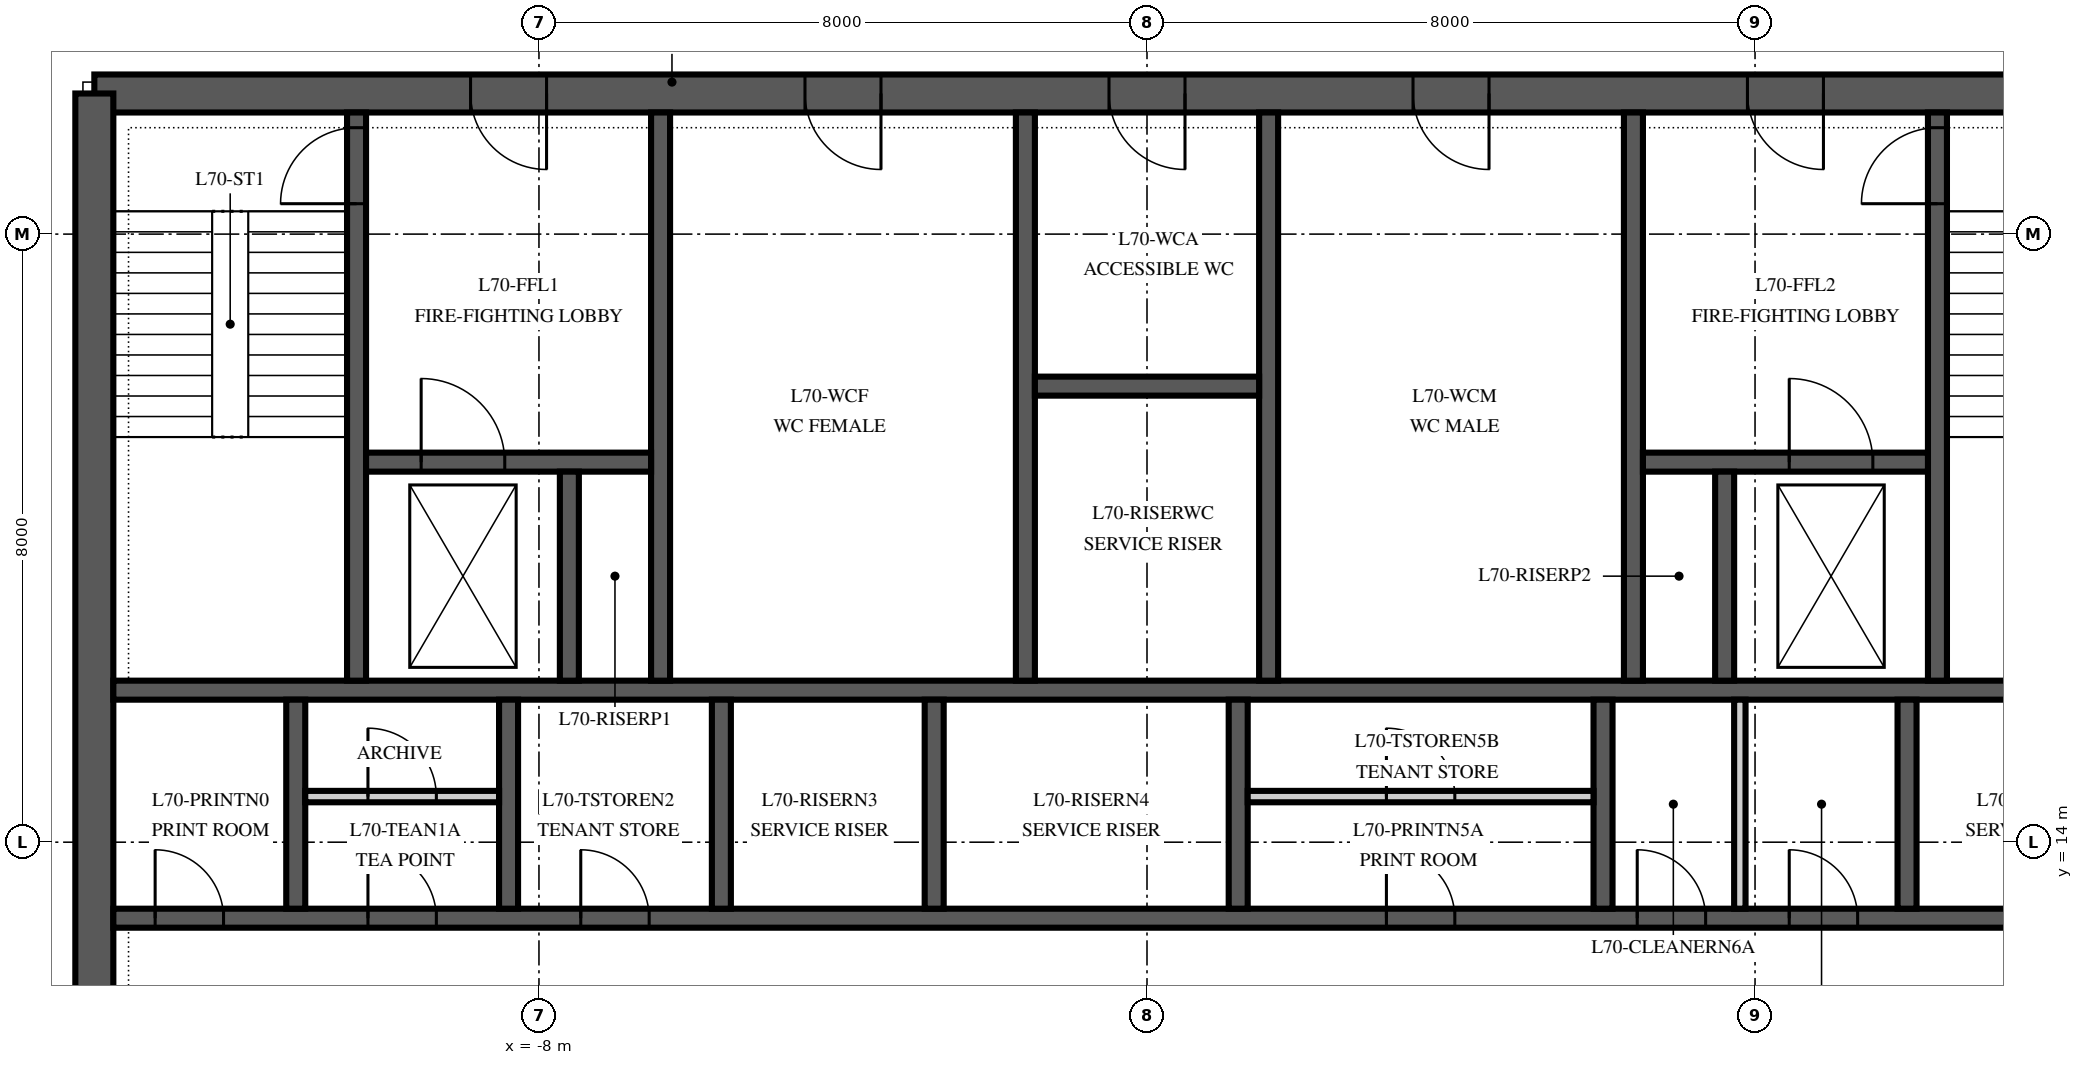
"""IFC4 building model, lengths in metres.
Left out: names, types, materials, properties, quantities, classifications, styles, units other than length and angle.
Written with IfcOpenShell. Run it as: python <this file> out.ifc"""

import sys

from ifc_helpers import new_model, si_unit, direction, frame, frame_2d, origin, place, context, subcontext, project, spatial, polyline, rectangle, outline, extrude, element, fill, save


model = new_model("IFC4")
c1 = context("Model", 3, precision=1e-05, world=origin(), true_north=direction((0.0, 1.0)))
c2 = subcontext(c1, "Body", "Model", "MODEL_VIEW")
j1 = project(units=[si_unit("LENGTHUNIT", "METRE"), si_unit("PLANEANGLEUNIT", "RADIAN")], contexts=[c1])
p1 = place(None, origin())
s1 = spatial("IfcSite", under=j1, at=p1, CompositionType="ELEMENT")
p2 = place(p1, origin())
s2 = spatial("IfcBuilding", under=s1, at=p2, CompositionType="ELEMENT")
p3 = place(p2, frame((0.0, 0.0, 300.0)))
s3 = spatial("IfcBuildingStorey", under=s2, at=p3, CompositionType="ELEMENT", Elevation=300.0)
p4 = place(p3, frame((13.85, 23.85, 0.0), z_axis=(0.0, 0.0, 1.0), x_axis=(-1.0, 0.0, 0.0)))
e1 = element("IfcWall", 1, at=p4, inside=s3, PredefinedType="SHEAR", context=c2, shape_type="SweptSolid", body=[
    extrude(rectangle(XDim=27.7, YDim=0.5, at=frame_2d((13.85, 0.0))), origin(), (0.0, 0.0, 1.0), 4.0),
])
p5 = place(p4, frame((21.75, 0.0, 0.0)))
e2 = element("IfcOpeningElement", 2, at=p5, cuts=e1, PredefinedType="OPENING", context=c2, shape_type="SweptSolid", body=[
    extrude(rectangle(XDim=1.0, YDim=2.1, at=frame_2d((0.5, 1.05))), frame((0.0, 0.265, 0.0), z_axis=(0.0, -1.0, 0.0), x_axis=(1.0, 0.0, 0.0)), (0.0, 0.0, 1.0), 0.53),
])
p6 = place(p4, frame((4.95, 0.0, 0.0)))
e3 = element("IfcOpeningElement", 3, at=p6, cuts=e1, PredefinedType="OPENING", context=c2, shape_type="SweptSolid", body=[
    extrude(rectangle(XDim=1.0, YDim=2.1, at=frame_2d((0.5, 1.05))), frame((0.0, 0.265, 0.0), z_axis=(0.0, -1.0, 0.0), x_axis=(1.0, 0.0, 0.0)), (0.0, 0.0, 1.0), 0.53),
])
p7 = place(p4, frame((17.35, 0.0, 0.0)))
e4 = element("IfcOpeningElement", 4, at=p7, cuts=e1, PredefinedType="OPENING", context=c2, shape_type="SweptSolid", body=[
    extrude(rectangle(XDim=1.0, YDim=2.1, at=frame_2d((0.5, 1.05))), frame((0.0, 0.265, 0.0), z_axis=(0.0, -1.0, 0.0), x_axis=(1.0, 0.0, 0.0)), (0.0, 0.0, 1.0), 0.53),
])
p8 = place(p4, frame((13.35, 0.0, 0.0)))
e5 = element("IfcOpeningElement", 5, at=p8, cuts=e1, PredefinedType="OPENING", context=c2, shape_type="SweptSolid", body=[
    extrude(rectangle(XDim=1.0, YDim=2.1, at=frame_2d((0.5, 1.05))), frame((0.0, 0.265, 0.0), z_axis=(0.0, -1.0, 0.0), x_axis=(1.0, 0.0, 0.0)), (0.0, 0.0, 1.0), 0.53),
])
p9 = place(p4, frame((9.35, 0.0, 0.0)))
e6 = element("IfcOpeningElement", 6, at=p9, cuts=e1, PredefinedType="OPENING", context=c2, shape_type="SweptSolid", body=[
    extrude(rectangle(XDim=1.0, YDim=2.1, at=frame_2d((0.5, 1.05))), frame((0.0, 0.265, 0.0), z_axis=(0.0, -1.0, 0.0), x_axis=(1.0, 0.0, 0.0)), (0.0, 0.0, 1.0), 0.53),
])
p10 = place(p3, frame((-13.85, 23.85, 0.0), z_axis=(0.0, 0.0, 1.0), x_axis=(0.0, -1.0, 0.0)))
e7 = element("IfcWall", 7, at=p10, inside=s3, PredefinedType="SHEAR", context=c2, shape_type="SweptSolid", body=[
    extrude(outline(polyline([(0.0, -0.25), (17.7, -0.25), (17.7, 0.0), (17.45, 0.0), (17.45, 0.25), (0.25, 0.25), (0.25, 0.0), (0.0, 0.0), (0.0, -0.25)])), origin(), (0.0, 0.0, 1.0), 4.0),
])
p11 = place(p10, frame((11.75, 0.0, 0.0)))
e8 = element("IfcOpeningElement", 8, at=p11, cuts=e7, PredefinedType="OPENING", context=c2, shape_type="SweptSolid", body=[
    extrude(rectangle(XDim=1.8, YDim=2.4, at=frame_2d((0.9, 1.2))), frame((0.0, 0.265, 0.0), z_axis=(0.0, -1.0, 0.0), x_axis=(1.0, 0.0, 0.0)), (0.0, 0.0, 1.0), 0.53),
])
p12 = place(p3, frame((-13.6, 13.0, 0.0), z_axis=(0.0, 0.0, 1.0), x_axis=(1.0, 0.0, 0.0)))
e9 = element("IfcWall", 9, at=p12, inside=s3, PredefinedType="SHEAR", context=c2, shape_type="SweptSolid", body=[
    extrude(rectangle(XDim=27.2, YDim=0.25, at=frame_2d((13.6, 0.0))), origin(), (0.0, 0.0, 1.0), 4.0),
])
p13 = place(p12, frame((16.75, 0.0, 0.0)))
e10 = element("IfcOpeningElement", 10, at=p13, cuts=e9, PredefinedType="OPENING", context=c2, shape_type="SweptSolid", body=[
    extrude(rectangle(XDim=0.9, YDim=2.1, at=frame_2d((0.45, 1.05))), frame((0.0, 0.14, 0.0), z_axis=(0.0, -1.0, 0.0), x_axis=(1.0, 0.0, 0.0)), (0.0, 0.0, 1.0), 0.28),
])
p14 = place(p12, frame((20.05, 0.0, 0.0)))
e11 = element("IfcOpeningElement", 11, at=p14, cuts=e9, PredefinedType="OPENING", context=c2, shape_type="SweptSolid", body=[
    extrude(rectangle(XDim=0.9, YDim=2.1, at=frame_2d((0.45, 1.05))), frame((0.0, 0.14, 0.0), z_axis=(0.0, -1.0, 0.0), x_axis=(1.0, 0.0, 0.0)), (0.0, 0.0, 1.0), 0.28),
])
p15 = place(p12, frame((22.05, 0.0, 0.0)))
e12 = element("IfcOpeningElement", 12, at=p15, cuts=e9, PredefinedType="OPENING", context=c2, shape_type="SweptSolid", body=[
    extrude(rectangle(XDim=0.9, YDim=2.1, at=frame_2d((0.45, 1.05))), frame((0.0, 0.14, 0.0), z_axis=(0.0, -1.0, 0.0), x_axis=(1.0, 0.0, 0.0)), (0.0, 0.0, 1.0), 0.28),
])
p16 = place(p12, frame((0.55, 0.0, 0.0)))
e13 = element("IfcOpeningElement", 13, at=p16, cuts=e9, PredefinedType="OPENING", context=c2, shape_type="SweptSolid", body=[
    extrude(rectangle(XDim=0.9, YDim=2.1, at=frame_2d((0.45, 1.05))), frame((0.0, 0.14, 0.0), z_axis=(0.0, -1.0, 0.0), x_axis=(1.0, 0.0, 0.0)), (0.0, 0.0, 1.0), 0.28),
])
p17 = place(p12, frame((3.35, 0.0, 0.0)))
e14 = element("IfcOpeningElement", 14, at=p17, cuts=e9, PredefinedType="OPENING", context=c2, shape_type="SweptSolid", body=[
    extrude(rectangle(XDim=0.9, YDim=2.1, at=frame_2d((0.45, 1.05))), frame((0.0, 0.14, 0.0), z_axis=(0.0, -1.0, 0.0), x_axis=(1.0, 0.0, 0.0)), (0.0, 0.0, 1.0), 0.28),
])
p18 = place(p12, frame((6.15, 0.0, 0.0)))
e15 = element("IfcOpeningElement", 15, at=p18, cuts=e9, PredefinedType="OPENING", context=c2, shape_type="SweptSolid", body=[
    extrude(rectangle(XDim=0.9, YDim=2.1, at=frame_2d((0.45, 1.05))), frame((0.0, 0.14, 0.0), z_axis=(0.0, -1.0, 0.0), x_axis=(1.0, 0.0, 0.0)), (0.0, 0.0, 1.0), 0.28),
])
p19 = place(p3, frame((-13.6, 16.0, 0.0), z_axis=(0.0, 0.0, 1.0), x_axis=(1.0, 0.0, 0.0)))
e16 = element("IfcWall", 16, at=p19, inside=s3, PredefinedType="SHEAR", context=c2, shape_type="SweptSolid", body=[
    extrude(rectangle(XDim=27.2, YDim=0.25, at=frame_2d((13.6, 0.0))), origin(), (0.0, 0.0, 1.0), 4.0),
])
for number, where, z_axis, x_axis in (
    (17, (-11.2, 13.125, 0.0), (0.0, 0.0, 1.0), (0.0, 1.0, 0.0)),
    (18, (-8.4, 13.125, 0.0), (0.0, 0.0, 1.0), (0.0, 1.0, 0.0)),
    (19, (-5.6, 13.125, 0.0), (0.0, 0.0, 1.0), (0.0, 1.0, 0.0)),
    (20, (-2.8, 13.125, 0.0), (0.0, 0.0, 1.0), (0.0, 1.0, 0.0)),
    (21, (1.2, 13.125, 0.0), (0.0, 0.0, 1.0), (0.0, 1.0, 0.0)),
    (22, (6.0, 13.125, 0.0), (0.0, 0.0, 1.0), (0.0, 1.0, 0.0)),
    (23, (10.0, 13.125, 0.0), (0.0, 0.0, 1.0), (0.0, 1.0, 0.0)),
):
    element("IfcWall", number, at=place(p3, frame(where, z_axis=z_axis, x_axis=x_axis)), inside=s3, PredefinedType="SHEAR", context=c2, shape_type="SweptSolid", body=[
        extrude(rectangle(XDim=2.75, YDim=0.25, at=frame_2d((1.375, 0.0))), origin(), (0.0, 0.0, 1.0), 4.0),
    ])
p20 = place(p3, frame((-10.4, 16.125, 0.0), z_axis=(0.0, 0.0, 1.0), x_axis=(0.0, 1.0, 0.0)))
e24 = element("IfcWall", 24, at=p20, inside=s3, PredefinedType="SHEAR", context=c2, shape_type="SweptSolid", body=[
    extrude(rectangle(XDim=7.475, YDim=0.25, at=frame_2d((3.738, 0.0))), origin(), (0.0, 0.0, 1.0), 4.0),
])
p21 = place(p20, frame((6.275, 0.0, 0.0)))
e25 = element("IfcOpeningElement", 25, at=p21, cuts=e24, PredefinedType="OPENING", context=c2, shape_type="SweptSolid", body=[
    extrude(rectangle(XDim=1.0, YDim=2.1, at=frame_2d((0.5, 1.05))), frame((0.0, 0.14, 0.0), z_axis=(0.0, -1.0, 0.0), x_axis=(1.0, 0.0, 0.0)), (0.0, 0.0, 1.0), 0.28),
])
for number, where, z_axis, x_axis in (
    (26, (-6.4, 16.125, 0.0), (0.0, 0.0, 1.0), (0.0, 1.0, 0.0)),
    (27, (-1.6, 16.125, 0.0), (0.0, 0.0, 1.0), (0.0, 1.0, 0.0)),
    (28, (1.6, 16.125, 0.0), (0.0, 0.0, 1.0), (0.0, 1.0, 0.0)),
    (29, (6.4, 16.125, 0.0), (0.0, 0.0, 1.0), (0.0, 1.0, 0.0)),
):
    element("IfcWall", number, at=place(p3, frame(where, z_axis=z_axis, x_axis=x_axis)), inside=s3, PredefinedType="SHEAR", context=c2, shape_type="SweptSolid", body=[
        extrude(rectangle(XDim=7.475, YDim=0.25, at=frame_2d((3.738, 0.0))), origin(), (0.0, 0.0, 1.0), 4.0),
    ])
p22 = place(p3, frame((10.4, 16.125, 0.0), z_axis=(0.0, 0.0, 1.0), x_axis=(0.0, 1.0, 0.0)))
e30 = element("IfcWall", 30, at=p22, inside=s3, PredefinedType="SHEAR", context=c2, shape_type="SweptSolid", body=[
    extrude(rectangle(XDim=7.475, YDim=0.25, at=frame_2d((3.738, 0.0))), origin(), (0.0, 0.0, 1.0), 4.0),
])
p23 = place(p22, frame((6.275, 0.0, 0.0)))
e31 = element("IfcOpeningElement", 31, at=p23, cuts=e30, PredefinedType="OPENING", context=c2, shape_type="SweptSolid", body=[
    extrude(rectangle(XDim=1.0, YDim=2.1, at=frame_2d((0.5, 1.05))), frame((0.0, 0.14, 0.0), z_axis=(0.0, -1.0, 0.0), x_axis=(1.0, 0.0, 0.0)), (0.0, 0.0, 1.0), 0.28),
])
p24 = place(p3, frame((-10.275, 19.0, 0.0), z_axis=(0.0, 0.0, 1.0), x_axis=(1.0, 0.0, 0.0)))
e32 = element("IfcWall", 32, at=p24, inside=s3, PredefinedType="SHEAR", context=c2, shape_type="SweptSolid", body=[
    extrude(rectangle(XDim=3.75, YDim=0.25, at=frame_2d((1.875, 0.0))), origin(), (0.0, 0.0, 1.0), 4.0),
])
p25 = place(p24, frame((0.725, 0.0, 0.0)))
e33 = element("IfcOpeningElement", 33, at=p25, cuts=e32, PredefinedType="OPENING", context=c2, shape_type="SweptSolid", body=[
    extrude(rectangle(XDim=1.1, YDim=2.1, at=frame_2d((0.55, 1.05))), frame((0.0, 0.14, 0.0), z_axis=(0.0, -1.0, 0.0), x_axis=(1.0, 0.0, 0.0)), (0.0, 0.0, 1.0), 0.28),
])
p26 = place(p3, frame((6.525, 19.0, 0.0), z_axis=(0.0, 0.0, 1.0), x_axis=(1.0, 0.0, 0.0)))
e34 = element("IfcWall", 34, at=p26, inside=s3, PredefinedType="SHEAR", context=c2, shape_type="SweptSolid", body=[
    extrude(rectangle(XDim=3.75, YDim=0.25, at=frame_2d((1.875, 0.0))), origin(), (0.0, 0.0, 1.0), 4.0),
])
p27 = place(p26, frame((1.925, 0.0, 0.0)))
e35 = element("IfcOpeningElement", 35, at=p27, cuts=e34, PredefinedType="OPENING", context=c2, shape_type="SweptSolid", body=[
    extrude(rectangle(XDim=1.1, YDim=2.1, at=frame_2d((0.55, 1.05))), frame((0.0, 0.14, 0.0), z_axis=(0.0, -1.0, 0.0), x_axis=(1.0, 0.0, 0.0)), (0.0, 0.0, 1.0), 0.28),
])
for number, where, z_axis, x_axis in (
    (36, (-7.6, 16.125, 0.0), (0.0, 0.0, 1.0), (0.0, 1.0, 0.0)),
    (37, (7.6, 16.125, 0.0), (0.0, 0.0, 1.0), (0.0, 1.0, 0.0)),
):
    element("IfcWall", number, at=place(p3, frame(where, z_axis=z_axis, x_axis=x_axis)), inside=s3, PredefinedType="SHEAR", context=c2, shape_type="SweptSolid", body=[
        extrude(rectangle(XDim=2.75, YDim=0.25, at=frame_2d((1.375, 0.0))), origin(), (0.0, 0.0, 1.0), 4.0),
    ])
p28 = place(p3, frame((-1.475, 20.0, 0.0), z_axis=(0.0, 0.0, 1.0), x_axis=(1.0, 0.0, 0.0)))
e38 = element("IfcWall", 38, at=p28, inside=s3, PredefinedType="SHEAR", context=c2, shape_type="SweptSolid", body=[
    extrude(rectangle(XDim=2.95, YDim=0.25, at=frame_2d((1.475, 0.0))), origin(), (0.0, 0.0, 1.0), 4.0),
])
p29 = place(p3, frame((1.325, 14.6, 0.0), z_axis=(0.0, 0.0, 1.0), x_axis=(1.0, 0.0, 0.0)))
e39 = element("IfcWall", 39, at=p29, inside=s3, PredefinedType="PARTITIONING", context=c2, shape_type="SweptSolid", body=[
    extrude(rectangle(XDim=4.55, YDim=0.15, at=frame_2d((2.275, 0.0))), origin(), (0.0, 0.0, 1.0), 3.85),
])
p30 = place(p29, frame((1.825, 0.0, 0.0)))
e40 = element("IfcOpeningElement", 40, at=p30, cuts=e39, PredefinedType="OPENING", context=c2, shape_type="SweptSolid", body=[
    extrude(rectangle(XDim=0.9, YDim=2.1, at=frame_2d((0.45, 1.05))), frame((0.0, 0.09, 0.0), z_axis=(0.0, -1.0, 0.0), x_axis=(1.0, 0.0, 0.0)), (0.0, 0.0, 1.0), 0.18),
])
p31 = place(p3, frame((7.8, 13.125, 0.0), z_axis=(0.0, 0.0, 1.0), x_axis=(0.0, 1.0, 0.0)))
e41 = element("IfcWall", 41, at=p31, inside=s3, PredefinedType="PARTITIONING", context=c2, shape_type="SweptSolid", body=[
    extrude(rectangle(XDim=2.75, YDim=0.15, at=frame_2d((1.375, 0.0))), origin(), (0.0, 0.0, 1.0), 3.85),
])
p32 = place(p3, frame((-11.075, 14.6, 0.0), z_axis=(0.0, 0.0, 1.0), x_axis=(1.0, 0.0, 0.0)))
e42 = element("IfcWall", 42, at=p32, inside=s3, PredefinedType="PARTITIONING", context=c2, shape_type="SweptSolid", body=[
    extrude(rectangle(XDim=2.55, YDim=0.15, at=frame_2d((1.275, 0.0))), origin(), (0.0, 0.0, 1.0), 3.85),
])
p33 = place(p32, frame((0.825, 0.0, 0.0)))
e43 = element("IfcOpeningElement", 43, at=p33, cuts=e42, PredefinedType="OPENING", context=c2, shape_type="SweptSolid", body=[
    extrude(rectangle(XDim=0.9, YDim=2.1, at=frame_2d((0.45, 1.05))), frame((0.0, 0.09, 0.0), z_axis=(0.0, -1.0, 0.0), x_axis=(1.0, 0.0, 0.0)), (0.0, 0.0, 1.0), 0.18),
])
p34 = place(p5, origin())
e44 = element("IfcDoor", 44, at=p34, inside=s3, OperationType="SINGLE_SWING_RIGHT", PredefinedType="DOOR", context=c2, shape_type="SweptSolid", body=[
    extrude(rectangle(XDim=1.0, YDim=2.1, at=frame_2d((0.5, 1.05))), frame((0.0, 0.25, 0.0), z_axis=(0.0, -1.0, 0.0), x_axis=(1.0, 0.0, 0.0)), (0.0, 0.0, 1.0), 0.5),
])
fill(e2, e44)
p35 = place(p6, origin())
e45 = element("IfcDoor", 45, at=p35, inside=s3, OperationType="SINGLE_SWING_RIGHT", PredefinedType="DOOR", context=c2, shape_type="SweptSolid", body=[
    extrude(rectangle(XDim=1.0, YDim=2.1, at=frame_2d((0.5, 1.05))), frame((0.0, 0.25, 0.0), z_axis=(0.0, -1.0, 0.0), x_axis=(1.0, 0.0, 0.0)), (0.0, 0.0, 1.0), 0.5),
])
fill(e3, e45)
p36 = place(p7, origin())
e46 = element("IfcDoor", 46, at=p36, inside=s3, OperationType="SINGLE_SWING_LEFT", PredefinedType="DOOR", context=c2, shape_type="SweptSolid", body=[
    extrude(rectangle(XDim=1.0, YDim=2.1, at=frame_2d((0.5, 1.05))), frame((0.0, 0.25, 0.0), z_axis=(0.0, -1.0, 0.0), x_axis=(1.0, 0.0, 0.0)), (0.0, 0.0, 1.0), 0.5),
])
fill(e4, e46)
p37 = place(p8, origin())
e47 = element("IfcDoor", 47, at=p37, inside=s3, OperationType="SINGLE_SWING_LEFT", PredefinedType="DOOR", context=c2, shape_type="SweptSolid", body=[
    extrude(rectangle(XDim=1.0, YDim=2.1, at=frame_2d((0.5, 1.05))), frame((0.0, 0.25, 0.0), z_axis=(0.0, -1.0, 0.0), x_axis=(1.0, 0.0, 0.0)), (0.0, 0.0, 1.0), 0.5),
])
fill(e5, e47)
p38 = place(p9, origin())
e48 = element("IfcDoor", 48, at=p38, inside=s3, OperationType="SINGLE_SWING_LEFT", PredefinedType="DOOR", context=c2, shape_type="SweptSolid", body=[
    extrude(rectangle(XDim=1.0, YDim=2.1, at=frame_2d((0.5, 1.05))), frame((0.0, 0.25, 0.0), z_axis=(0.0, -1.0, 0.0), x_axis=(1.0, 0.0, 0.0)), (0.0, 0.0, 1.0), 0.5),
])
fill(e6, e48)
p39 = place(p21, origin())
e49 = element("IfcDoor", 49, at=p39, inside=s3, OperationType="SINGLE_SWING_LEFT", PredefinedType="DOOR", context=c2, shape_type="SweptSolid", body=[
    extrude(rectangle(XDim=1.0, YDim=2.1, at=frame_2d((0.5, 1.05))), frame((0.0, 0.125, 0.0), z_axis=(0.0, -1.0, 0.0), x_axis=(1.0, 0.0, 0.0)), (0.0, 0.0, 1.0), 0.25),
])
fill(e25, e49)
p40 = place(p23, origin())
e50 = element("IfcDoor", 50, at=p40, inside=s3, OperationType="SINGLE_SWING_LEFT", PredefinedType="DOOR", context=c2, shape_type="SweptSolid", body=[
    extrude(rectangle(XDim=1.0, YDim=2.1, at=frame_2d((0.5, 1.05))), frame((0.0, 0.125, 0.0), z_axis=(0.0, -1.0, 0.0), x_axis=(1.0, 0.0, 0.0)), (0.0, 0.0, 1.0), 0.25),
])
fill(e31, e50)
p41 = place(p27, origin())
e51 = element("IfcDoor", 51, at=p41, inside=s3, OperationType="SLIDING_TO_RIGHT", PredefinedType="DOOR", context=c2, shape_type="SweptSolid", body=[
    extrude(rectangle(XDim=1.1, YDim=2.1, at=frame_2d((0.55, 1.05))), frame((0.0, 0.125, 0.0), z_axis=(0.0, -1.0, 0.0), x_axis=(1.0, 0.0, 0.0)), (0.0, 0.0, 1.0), 0.25),
])
fill(e35, e51)
p42 = place(p25, origin())
e52 = element("IfcDoor", 52, at=p42, inside=s3, OperationType="SLIDING_TO_RIGHT", PredefinedType="DOOR", context=c2, shape_type="SweptSolid", body=[
    extrude(rectangle(XDim=1.1, YDim=2.1, at=frame_2d((0.55, 1.05))), frame((0.0, 0.125, 0.0), z_axis=(0.0, -1.0, 0.0), x_axis=(1.0, 0.0, 0.0)), (0.0, 0.0, 1.0), 0.25),
])
fill(e33, e52)
p43 = place(p13, origin())
e53 = element("IfcDoor", 53, at=p43, inside=s3, OperationType="SINGLE_SWING_LEFT", PredefinedType="DOOR", context=c2, shape_type="SweptSolid", body=[
    extrude(rectangle(XDim=0.9, YDim=2.1, at=frame_2d((0.45, 1.05))), frame((0.0, 0.125, 0.0), z_axis=(0.0, -1.0, 0.0), x_axis=(1.0, 0.0, 0.0)), (0.0, 0.0, 1.0), 0.25),
])
fill(e10, e53)
p44 = place(p30, origin())
e54 = element("IfcDoor", 54, at=p44, inside=s3, OperationType="SINGLE_SWING_LEFT", PredefinedType="DOOR", context=c2, shape_type="SweptSolid", body=[
    extrude(rectangle(XDim=0.9, YDim=2.1, at=frame_2d((0.45, 1.05))), frame((0.0, 0.075, 0.0), z_axis=(0.0, -1.0, 0.0), x_axis=(1.0, 0.0, 0.0)), (0.0, 0.0, 1.0), 0.149),
])
fill(e40, e54)
p45 = place(p14, origin())
e55 = element("IfcDoor", 55, at=p45, inside=s3, OperationType="SINGLE_SWING_LEFT", PredefinedType="DOOR", context=c2, shape_type="SweptSolid", body=[
    extrude(rectangle(XDim=0.9, YDim=2.1, at=frame_2d((0.45, 1.05))), frame((0.0, 0.125, 0.0), z_axis=(0.0, -1.0, 0.0), x_axis=(1.0, 0.0, 0.0)), (0.0, 0.0, 1.0), 0.25),
])
fill(e11, e55)
p46 = place(p15, origin())
e56 = element("IfcDoor", 56, at=p46, inside=s3, OperationType="SINGLE_SWING_LEFT", PredefinedType="DOOR", context=c2, shape_type="SweptSolid", body=[
    extrude(rectangle(XDim=0.9, YDim=2.1, at=frame_2d((0.45, 1.05))), frame((0.0, 0.125, 0.0), z_axis=(0.0, -1.0, 0.0), x_axis=(1.0, 0.0, 0.0)), (0.0, 0.0, 1.0), 0.25),
])
fill(e12, e56)
p47 = place(p16, origin())
e57 = element("IfcDoor", 57, at=p47, inside=s3, OperationType="SINGLE_SWING_LEFT", PredefinedType="DOOR", context=c2, shape_type="SweptSolid", body=[
    extrude(rectangle(XDim=0.9, YDim=2.1, at=frame_2d((0.45, 1.05))), frame((0.0, 0.125, 0.0), z_axis=(0.0, -1.0, 0.0), x_axis=(1.0, 0.0, 0.0)), (0.0, 0.0, 1.0), 0.25),
])
fill(e13, e57)
p48 = place(p17, origin())
e58 = element("IfcDoor", 58, at=p48, inside=s3, OperationType="SINGLE_SWING_LEFT", PredefinedType="DOOR", context=c2, shape_type="SweptSolid", body=[
    extrude(rectangle(XDim=0.9, YDim=2.1, at=frame_2d((0.45, 1.05))), frame((0.0, 0.125, 0.0), z_axis=(0.0, -1.0, 0.0), x_axis=(1.0, 0.0, 0.0)), (0.0, 0.0, 1.0), 0.25),
])
fill(e14, e58)
p49 = place(p33, origin())
e59 = element("IfcDoor", 59, at=p49, inside=s3, OperationType="SINGLE_SWING_LEFT", PredefinedType="DOOR", context=c2, shape_type="SweptSolid", body=[
    extrude(rectangle(XDim=0.9, YDim=2.1, at=frame_2d((0.45, 1.05))), frame((0.0, 0.075, 0.0), z_axis=(0.0, -1.0, 0.0), x_axis=(1.0, 0.0, 0.0)), (0.0, 0.0, 1.0), 0.149),
])
fill(e43, e59)
p50 = place(p18, origin())
e60 = element("IfcDoor", 60, at=p50, inside=s3, OperationType="SINGLE_SWING_LEFT", PredefinedType="DOOR", context=c2, shape_type="SweptSolid", body=[
    extrude(rectangle(XDim=0.9, YDim=2.1, at=frame_2d((0.45, 1.05))), frame((0.0, 0.125, 0.0), z_axis=(0.0, -1.0, 0.0), x_axis=(1.0, 0.0, 0.0)), (0.0, 0.0, 1.0), 0.25),
])
fill(e15, e60)
save(model, sys.argv[1])
